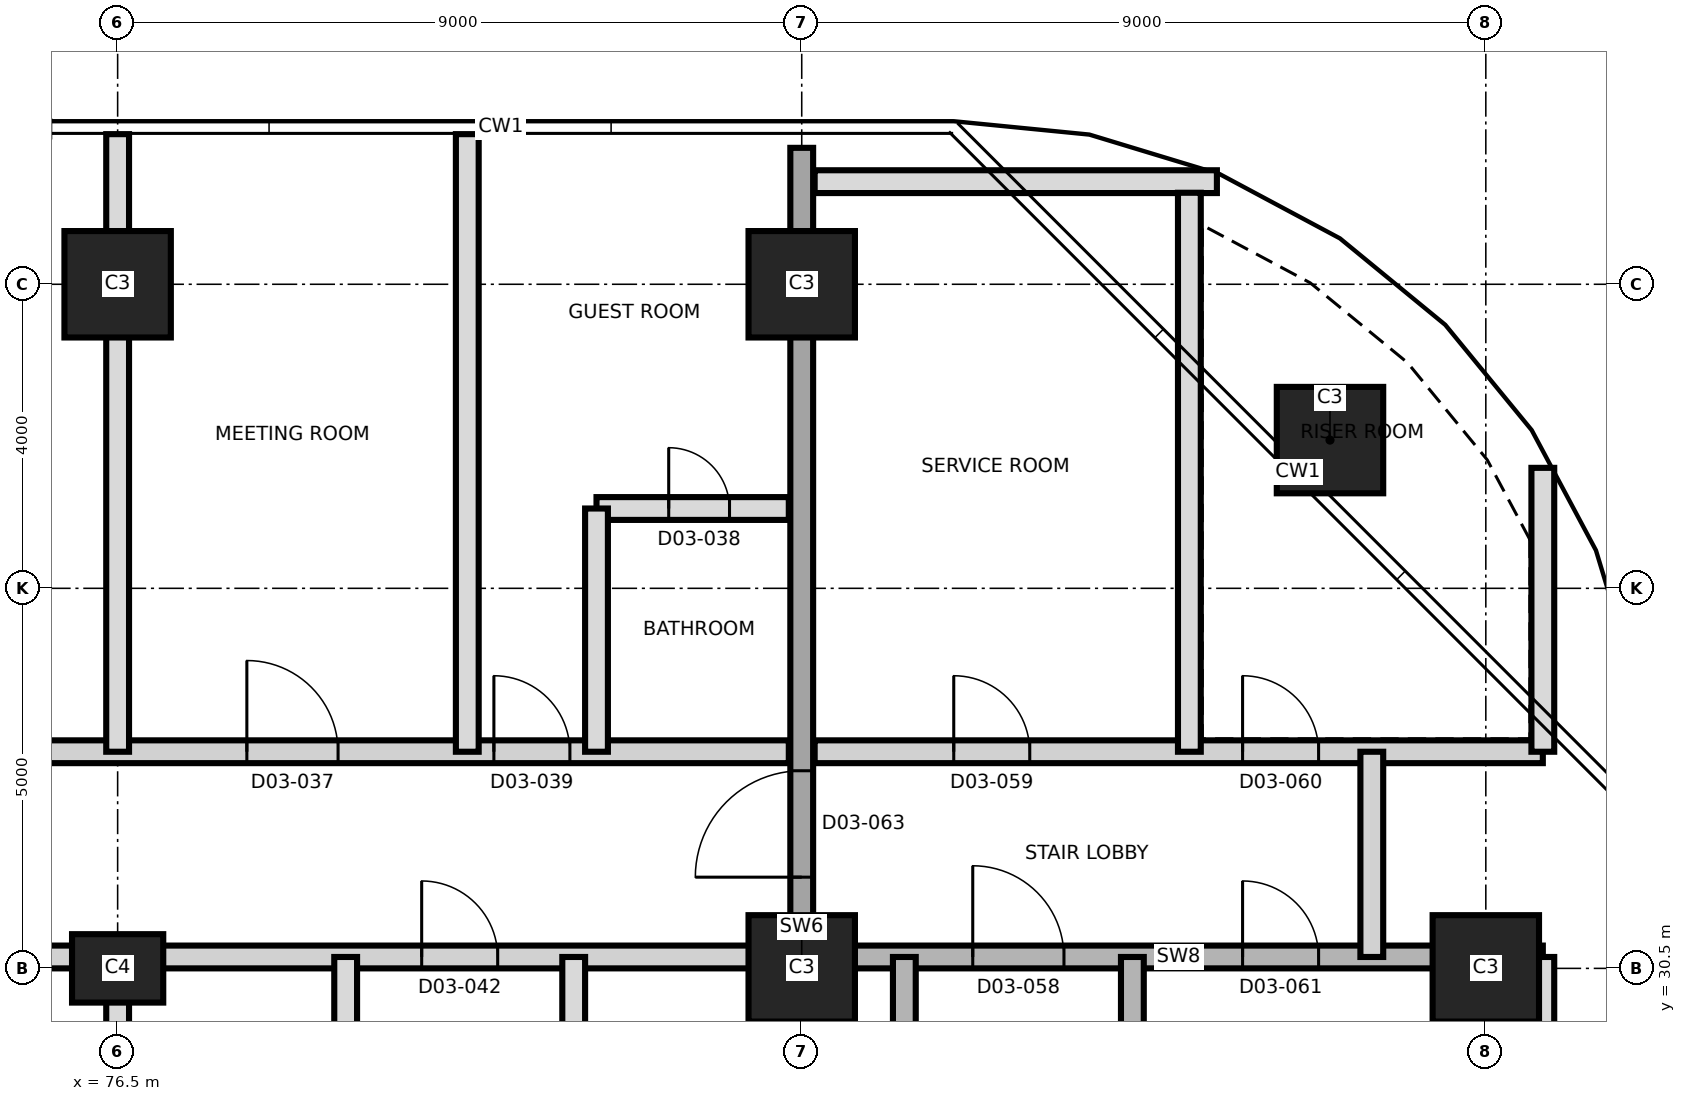
"""IFC4 building model, lengths in metres.
Left out: names, types, materials, properties, quantities, classifications, styles, units other than length and angle.
Written with IfcOpenShell. Run it as: python <this file> out.ifc"""

import sys

from ifc_helpers import new_model, si_unit, direction, frame, frame_2d, origin, origin_2d, place, context, subcontext, project, spatial, rectangle, extrude, element, fill, save


model = new_model("IFC4")
c1 = context("Model", 3, precision=1e-05, world=origin(), true_north=direction((0.0, 1.0)))
c2 = subcontext(c1, "Body", "Model", "MODEL_VIEW")
j1 = project(units=[si_unit("LENGTHUNIT", "METRE"), si_unit("PLANEANGLEUNIT", "RADIAN")], contexts=[c1])
p1 = place(None, origin())
s1 = spatial("IfcSite", under=j1, at=p1, CompositionType="ELEMENT")
p2 = place(p1, origin())
s2 = spatial("IfcBuilding", under=s1, at=p2, CompositionType="ELEMENT")
p3 = place(p2, frame((0.0, 0.0, 55.7)))
s3 = spatial("IfcBuildingStorey", under=s2, at=p3, CompositionType="ELEMENT", Elevation=55.7)
p4 = place(p3, frame((76.5, 30.5, 0.0), z_axis=(0.0, 0.0, 1.0), x_axis=(1.0, 0.0, 0.0)))
e1 = element("IfcColumn", 1, at=p4, inside=s3, PredefinedType="COLUMN", context=c2, shape_type="SweptSolid", body=[
    extrude(rectangle(XDim=1.2, YDim=0.9, at=origin_2d()), origin(), (0.0, 0.0, 1.0), 3.7),
])
for number, where, z_axis, x_axis in (
    (2, (85.5, 30.5, 0.0), (0.0, 0.0, 1.0), (1.0, 0.0, 0.0)),
    (3, (94.5, 30.5, 0.0), (0.0, 0.0, 1.0), (1.0, 0.0, 0.0)),
    (4, (92.45, 37.45, 0.0), (0.0, 0.0, 1.0), (1.0, 0.0, 0.0)),
    (5, (76.5, 39.5, 0.0), (0.0, 0.0, 1.0), (1.0, 0.0, 0.0)),
    (6, (85.5, 39.5, 0.0), (0.0, 0.0, 1.0), (1.0, 0.0, 0.0)),
):
    element("IfcColumn", number, at=place(p3, frame(where, z_axis=z_axis, x_axis=x_axis)), inside=s3, PredefinedType="COLUMN", context=c2, shape_type="SweptSolid", body=[
        extrude(rectangle(XDim=1.4, YDim=1.4, at=origin_2d()), origin(), (0.0, 0.0, 1.0), 3.7),
    ])
p5 = place(p3, frame((85.5, 19.705, 0.0), z_axis=(0.0, 0.0, 1.0), x_axis=(0.0, 1.0, 0.0)))
e7 = element("IfcWall", 7, at=p5, inside=s3, PredefinedType="SHEAR", context=c2, shape_type="SweptSolid", body=[
    extrude(rectangle(XDim=21.59, YDim=0.3, at=frame_2d((10.795, 0.0))), origin(), (0.0, 0.0, 1.0), 3.7),
])
p6 = place(p5, frame((11.995, 0.0, 0.0)))
e8 = element("IfcOpeningElement", 8, at=p6, cuts=e7, PredefinedType="OPENING", context=c2, shape_type="SweptSolid", body=[
    extrude(rectangle(XDim=1.4, YDim=2.1, at=frame_2d((0.7, 1.05))), frame((0.0, 0.16, 0.0), z_axis=(0.0, -1.0, 0.0), x_axis=(1.0, 0.0, 0.0)), (0.0, 0.0, 1.0), 0.32),
])
p7 = place(p3, frame((58.95, 30.65, 0.0), z_axis=(0.0, 0.0, 1.0), x_axis=(1.0, 0.0, 0.0)))
e9 = element("IfcWall", 9, at=p7, inside=s3, PredefinedType="PARTITIONING", context=c2, shape_type="SweptSolid", body=[
    extrude(rectangle(XDim=26.38, YDim=0.3, at=frame_2d((13.19, 0.0))), origin(), (0.0, 0.0, 1.0), 3.4),
])
p8 = place(p7, frame((0.685, 0.0, 0.0)))
e10 = element("IfcOpeningElement", 10, at=p8, cuts=e9, PredefinedType="OPENING", context=c2, shape_type="SweptSolid", body=[
    extrude(rectangle(XDim=1.2, YDim=2.1, at=frame_2d((0.6, 1.05))), frame((0.0, 0.16, 0.0), z_axis=(0.0, -1.0, 0.0), x_axis=(1.0, 0.0, 0.0)), (0.0, 0.0, 1.0), 0.32),
])
p9 = place(p7, frame((3.935, 0.0, 0.0)))
e11 = element("IfcOpeningElement", 11, at=p9, cuts=e9, PredefinedType="OPENING", context=c2, shape_type="SweptSolid", body=[
    extrude(rectangle(XDim=1.0, YDim=2.1, at=frame_2d((0.5, 1.05))), frame((0.0, 0.16, 0.0), z_axis=(0.0, -1.0, 0.0), x_axis=(1.0, 0.0, 0.0)), (0.0, 0.0, 1.0), 0.32),
])
p10 = place(p7, frame((9.685, 0.0, 0.0)))
e12 = element("IfcOpeningElement", 12, at=p10, cuts=e9, PredefinedType="OPENING", context=c2, shape_type="SweptSolid", body=[
    extrude(rectangle(XDim=1.2, YDim=2.1, at=frame_2d((0.6, 1.05))), frame((0.0, 0.16, 0.0), z_axis=(0.0, -1.0, 0.0), x_axis=(1.0, 0.0, 0.0)), (0.0, 0.0, 1.0), 0.32),
])
p11 = place(p7, frame((12.935, 0.0, 0.0)))
e13 = element("IfcOpeningElement", 13, at=p11, cuts=e9, PredefinedType="OPENING", context=c2, shape_type="SweptSolid", body=[
    extrude(rectangle(XDim=1.0, YDim=2.1, at=frame_2d((0.5, 1.05))), frame((0.0, 0.16, 0.0), z_axis=(0.0, -1.0, 0.0), x_axis=(1.0, 0.0, 0.0)), (0.0, 0.0, 1.0), 0.32),
])
p12 = place(p7, frame((21.55, 0.0, 0.0)))
e14 = element("IfcOpeningElement", 14, at=p12, cuts=e9, PredefinedType="OPENING", context=c2, shape_type="SweptSolid", body=[
    extrude(rectangle(XDim=1.0, YDim=2.4, at=frame_2d((0.5, 1.2))), frame((0.0, 0.16, 0.0), z_axis=(0.0, -1.0, 0.0), x_axis=(1.0, 0.0, 0.0)), (0.0, 0.0, 1.0), 0.32),
])
p13 = place(p3, frame((85.67, 30.65, 0.0), z_axis=(0.0, 0.0, 1.0), x_axis=(1.0, 0.0, 0.0)))
e15 = element("IfcWall", 15, at=p13, inside=s3, PredefinedType="SHEAR", context=c2, shape_type="SweptSolid", body=[
    extrude(rectangle(XDim=9.58, YDim=0.3, at=frame_2d((4.79, 0.0))), origin(), (0.0, 0.0, 1.0), 3.4),
])
p14 = place(p13, frame((2.08, 0.0, 0.0)))
e16 = element("IfcOpeningElement", 16, at=p14, cuts=e15, PredefinedType="OPENING", context=c2, shape_type="SweptSolid", body=[
    extrude(rectangle(XDim=1.2, YDim=2.1, at=frame_2d((0.6, 1.05))), frame((0.0, 0.16, 0.0), z_axis=(0.0, -1.0, 0.0), x_axis=(1.0, 0.0, 0.0)), (0.0, 0.0, 1.0), 0.32),
])
p15 = place(p13, frame((5.63, 0.0, 0.0)))
e17 = element("IfcOpeningElement", 17, at=p15, cuts=e15, PredefinedType="OPENING", context=c2, shape_type="SweptSolid", body=[
    extrude(rectangle(XDim=1.0, YDim=2.1, at=frame_2d((0.5, 1.05))), frame((0.0, 0.16, 0.0), z_axis=(0.0, -1.0, 0.0), x_axis=(1.0, 0.0, 0.0)), (0.0, 0.0, 1.0), 0.32),
])
p16 = place(p3, frame((58.95, 33.35, 0.0), z_axis=(0.0, 0.0, 1.0), x_axis=(1.0, 0.0, 0.0)))
e18 = element("IfcWall", 18, at=p16, inside=s3, PredefinedType="PARTITIONING", context=c2, shape_type="SweptSolid", body=[
    extrude(rectangle(XDim=26.38, YDim=0.3, at=frame_2d((13.19, 0.0))), origin(), (0.0, 0.0, 1.0), 3.4),
])
p17 = place(p16, frame((0.685, 0.0, 0.0)))
e19 = element("IfcOpeningElement", 19, at=p17, cuts=e18, PredefinedType="OPENING", context=c2, shape_type="SweptSolid", body=[
    extrude(rectangle(XDim=1.2, YDim=2.1, at=frame_2d((0.6, 1.05))), frame((0.0, 0.16, 0.0), z_axis=(0.0, -1.0, 0.0), x_axis=(1.0, 0.0, 0.0)), (0.0, 0.0, 1.0), 0.32),
])
p18 = place(p16, frame((3.935, 0.0, 0.0)))
e20 = element("IfcOpeningElement", 20, at=p18, cuts=e18, PredefinedType="OPENING", context=c2, shape_type="SweptSolid", body=[
    extrude(rectangle(XDim=1.0, YDim=2.1, at=frame_2d((0.5, 1.05))), frame((0.0, 0.16, 0.0), z_axis=(0.0, -1.0, 0.0), x_axis=(1.0, 0.0, 0.0)), (0.0, 0.0, 1.0), 0.32),
])
p19 = place(p16, frame((14.2, 0.0, 0.0)))
e21 = element("IfcOpeningElement", 21, at=p19, cuts=e18, PredefinedType="OPENING", context=c2, shape_type="SweptSolid", body=[
    extrude(rectangle(XDim=1.0, YDim=2.4, at=frame_2d((0.5, 1.2))), frame((0.0, 0.16, 0.0), z_axis=(0.0, -1.0, 0.0), x_axis=(1.0, 0.0, 0.0)), (0.0, 0.0, 1.0), 0.32),
])
p20 = place(p16, frame((19.25, 0.0, 0.0)))
e22 = element("IfcOpeningElement", 22, at=p20, cuts=e18, PredefinedType="OPENING", context=c2, shape_type="SweptSolid", body=[
    extrude(rectangle(XDim=1.2, YDim=2.1, at=frame_2d((0.6, 1.05))), frame((0.0, 0.16, 0.0), z_axis=(0.0, -1.0, 0.0), x_axis=(1.0, 0.0, 0.0)), (0.0, 0.0, 1.0), 0.32),
])
p21 = place(p16, frame((22.5, 0.0, 0.0)))
e23 = element("IfcOpeningElement", 23, at=p21, cuts=e18, PredefinedType="OPENING", context=c2, shape_type="SweptSolid", body=[
    extrude(rectangle(XDim=1.0, YDim=2.1, at=frame_2d((0.5, 1.05))), frame((0.0, 0.16, 0.0), z_axis=(0.0, -1.0, 0.0), x_axis=(1.0, 0.0, 0.0)), (0.0, 0.0, 1.0), 0.32),
])
p22 = place(p3, frame((85.67, 33.35, 0.0), z_axis=(0.0, 0.0, 1.0), x_axis=(1.0, 0.0, 0.0)))
e24 = element("IfcWall", 24, at=p22, inside=s3, PredefinedType="PARTITIONING", context=c2, shape_type="SweptSolid", body=[
    extrude(rectangle(XDim=9.58, YDim=0.3, at=frame_2d((4.79, 0.0))), origin(), (0.0, 0.0, 1.0), 3.4),
])
p23 = place(p22, frame((1.83, 0.0, 0.0)))
e25 = element("IfcOpeningElement", 25, at=p23, cuts=e24, PredefinedType="OPENING", context=c2, shape_type="SweptSolid", body=[
    extrude(rectangle(XDim=1.0, YDim=2.1, at=frame_2d((0.5, 1.05))), frame((0.0, 0.16, 0.0), z_axis=(0.0, -1.0, 0.0), x_axis=(1.0, 0.0, 0.0)), (0.0, 0.0, 1.0), 0.32),
])
p24 = place(p22, frame((5.63, 0.0, 0.0)))
e26 = element("IfcOpeningElement", 26, at=p24, cuts=e24, PredefinedType="OPENING", context=c2, shape_type="SweptSolid", body=[
    extrude(rectangle(XDim=1.0, YDim=2.1, at=frame_2d((0.5, 1.05))), frame((0.0, 0.16, 0.0), z_axis=(0.0, -1.0, 0.0), x_axis=(1.0, 0.0, 0.0)), (0.0, 0.0, 1.0), 0.32),
])
p25 = place(p3, frame((82.8, 36.55, 0.0), z_axis=(0.0, 0.0, 1.0), x_axis=(1.0, 0.0, 0.0)))
e27 = element("IfcWall", 27, at=p25, inside=s3, PredefinedType="PARTITIONING", context=c2, shape_type="SweptSolid", body=[
    extrude(rectangle(XDim=2.53, YDim=0.3, at=frame_2d((1.265, 0.0))), origin(), (0.0, 0.0, 1.0), 3.4),
])
p26 = place(p25, frame((0.95, 0.0, 0.0)))
e28 = element("IfcOpeningElement", 28, at=p26, cuts=e27, PredefinedType="OPENING", context=c2, shape_type="SweptSolid", body=[
    extrude(rectangle(XDim=0.8, YDim=2.1, at=frame_2d((0.4, 1.05))), frame((0.0, 0.16, 0.0), z_axis=(0.0, -1.0, 0.0), x_axis=(1.0, 0.0, 0.0)), (0.0, 0.0, 1.0), 0.32),
])
p27 = place(p3, frame((85.67, 40.85, 0.0), z_axis=(0.0, 0.0, 1.0), x_axis=(1.0, 0.0, 0.0)))
e29 = element("IfcWall", 29, at=p27, inside=s3, PredefinedType="PARTITIONING", context=c2, shape_type="SweptSolid", body=[
    extrude(rectangle(XDim=5.292, YDim=0.3, at=frame_2d((2.646, 0.0))), origin(), (0.0, 0.0, 1.0), 3.4),
])
p28 = place(p3, frame((76.5, 19.705, 0.0), z_axis=(0.0, 0.0, 1.0), x_axis=(0.0, 1.0, 0.0)))
e30 = element("IfcWall", 30, at=p28, inside=s3, PredefinedType="PARTITIONING", context=c2, shape_type="SweptSolid", body=[
    extrude(rectangle(XDim=10.945, YDim=0.3, at=frame_2d((5.472, 0.0))), origin(), (0.0, 0.0, 1.0), 3.4),
])
p29 = place(p3, frame((76.5, 33.35, 0.0), z_axis=(0.0, 0.0, 1.0), x_axis=(0.0, 1.0, 0.0)))
e31 = element("IfcWall", 31, at=p29, inside=s3, PredefinedType="PARTITIONING", context=c2, shape_type="SweptSolid", body=[
    extrude(rectangle(XDim=8.125, YDim=0.3, at=frame_2d((4.062, 0.0))), origin(), (0.0, 0.0, 1.0), 3.4),
])
p30 = place(p3, frame((79.5, 27.35, 0.0), z_axis=(0.0, 0.0, 1.0), x_axis=(0.0, 1.0, 0.0)))
e32 = element("IfcWall", 32, at=p30, inside=s3, PredefinedType="PARTITIONING", context=c2, shape_type="SweptSolid", body=[
    extrude(rectangle(XDim=3.3, YDim=0.3, at=frame_2d((1.65, 0.0))), origin(), (0.0, 0.0, 1.0), 3.4),
])
p31 = place(p3, frame((81.1, 33.35, 0.0), z_axis=(0.0, 0.0, 1.0), x_axis=(0.0, 1.0, 0.0)))
e33 = element("IfcWall", 33, at=p31, inside=s3, PredefinedType="PARTITIONING", context=c2, shape_type="SweptSolid", body=[
    extrude(rectangle(XDim=8.125, YDim=0.3, at=frame_2d((4.062, 0.0))), origin(), (0.0, 0.0, 1.0), 3.4),
])
p32 = place(p3, frame((82.5, 27.35, 0.0), z_axis=(0.0, 0.0, 1.0), x_axis=(0.0, 1.0, 0.0)))
e34 = element("IfcWall", 34, at=p32, inside=s3, PredefinedType="PARTITIONING", context=c2, shape_type="SweptSolid", body=[
    extrude(rectangle(XDim=3.3, YDim=0.3, at=frame_2d((1.65, 0.0))), origin(), (0.0, 0.0, 1.0), 3.4),
])
p33 = place(p3, frame((82.8, 33.35, 0.0), z_axis=(0.0, 0.0, 1.0), x_axis=(0.0, 1.0, 0.0)))
e35 = element("IfcWall", 35, at=p33, inside=s3, PredefinedType="PARTITIONING", context=c2, shape_type="SweptSolid", body=[
    extrude(rectangle(XDim=3.2, YDim=0.3, at=frame_2d((1.6, 0.0))), origin(), (0.0, 0.0, 1.0), 3.4),
])
for number, where, z_axis, x_axis in (
    (36, (86.85, 21.8, 0.0), (0.0, 0.0, 1.0), (0.0, 1.0, 0.0)),
    (37, (89.85, 21.8, 0.0), (0.0, 0.0, 1.0), (0.0, 1.0, 0.0)),
):
    element("IfcWall", number, at=place(p3, frame(where, z_axis=z_axis, x_axis=x_axis)), inside=s3, PredefinedType="SHEAR", context=c2, shape_type="SweptSolid", body=[
        extrude(rectangle(XDim=8.85, YDim=0.3, at=frame_2d((4.425, 0.0))), origin(), (0.0, 0.0, 1.0), 3.4),
    ])
p34 = place(p3, frame((90.6, 33.35, 0.0), z_axis=(0.0, 0.0, 1.0), x_axis=(0.0, 1.0, 0.0)))
e38 = element("IfcWall", 38, at=p34, inside=s3, PredefinedType="PARTITIONING", context=c2, shape_type="SweptSolid", body=[
    extrude(rectangle(XDim=7.354, YDim=0.3, at=frame_2d((3.677, 0.0))), origin(), (0.0, 0.0, 1.0), 3.4),
])
p35 = place(p3, frame((93.0, 30.65, 0.0), z_axis=(0.0, 0.0, 1.0), x_axis=(0.0, 1.0, 0.0)))
e39 = element("IfcWall", 39, at=p35, inside=s3, PredefinedType="PARTITIONING", context=c2, shape_type="SweptSolid", body=[
    extrude(rectangle(XDim=2.7, YDim=0.3, at=frame_2d((1.35, 0.0))), origin(), (0.0, 0.0, 1.0), 3.4),
])
p36 = place(p3, frame((95.25, 23.915, 0.0), z_axis=(0.0, 0.0, 1.0), x_axis=(0.0, 1.0, 0.0)))
e40 = element("IfcWall", 40, at=p36, inside=s3, PredefinedType="PARTITIONING", context=c2, shape_type="SweptSolid", body=[
    extrude(rectangle(XDim=6.735, YDim=0.3, at=frame_2d((3.367, 0.0))), origin(), (0.0, 0.0, 1.0), 3.4),
])
p37 = place(p3, frame((95.25, 33.35, 0.0), z_axis=(0.0, 0.0, 1.0), x_axis=(0.0, 1.0, 0.0)))
e41 = element("IfcWall", 41, at=p37, inside=s3, PredefinedType="PARTITIONING", context=c2, shape_type="SweptSolid", body=[
    extrude(rectangle(XDim=3.735, YDim=0.3, at=frame_2d((1.867, 0.0))), origin(), (0.0, 0.0, 1.0), 3.4),
])
p38 = place(p20, origin())
e42 = element("IfcDoor", 42, at=p38, inside=s3, OperationType="SINGLE_SWING_RIGHT", PredefinedType="DOOR", context=c2, shape_type="SweptSolid", body=[
    extrude(rectangle(XDim=1.2, YDim=2.1, at=frame_2d((0.6, 1.05))), frame((0.0, 0.025, 0.0), z_axis=(0.0, -1.0, 0.0), x_axis=(1.0, 0.0, 0.0)), (0.0, 0.0, 1.0), 0.05),
])
fill(e22, e42)
p39 = place(p26, origin())
e43 = element("IfcDoor", 43, at=p39, inside=s3, OperationType="SINGLE_SWING_LEFT", PredefinedType="DOOR", context=c2, shape_type="SweptSolid", body=[
    extrude(rectangle(XDim=0.8, YDim=2.1, at=frame_2d((0.4, 1.05))), frame((0.0, 0.025, 0.0), z_axis=(0.0, -1.0, 0.0), x_axis=(1.0, 0.0, 0.0)), (0.0, 0.0, 1.0), 0.05),
])
fill(e28, e43)
p40 = place(p21, origin())
e44 = element("IfcDoor", 44, at=p40, inside=s3, OperationType="SINGLE_SWING_LEFT", PredefinedType="DOOR", context=c2, shape_type="SweptSolid", body=[
    extrude(rectangle(XDim=1.0, YDim=2.1, at=frame_2d((0.5, 1.05))), frame((0.0, 0.025, 0.0), z_axis=(0.0, -1.0, 0.0), x_axis=(1.0, 0.0, 0.0)), (0.0, 0.0, 1.0), 0.05),
])
fill(e23, e44)
p41 = place(p12, origin())
e45 = element("IfcDoor", 45, at=p41, inside=s3, OperationType="SINGLE_SWING_RIGHT", PredefinedType="DOOR", context=c2, shape_type="SweptSolid", body=[
    extrude(rectangle(XDim=1.0, YDim=2.4, at=frame_2d((0.5, 1.2))), frame((0.0, 0.025, 0.0), z_axis=(0.0, -1.0, 0.0), x_axis=(1.0, 0.0, 0.0)), (0.0, 0.0, 1.0), 0.05),
])
fill(e14, e45)
p42 = place(p14, origin())
e46 = element("IfcDoor", 46, at=p42, inside=s3, OperationType="SINGLE_SWING_LEFT", PredefinedType="DOOR", context=c2, shape_type="SweptSolid", body=[
    extrude(rectangle(XDim=1.2, YDim=2.1, at=frame_2d((0.6, 1.05))), frame((0.0, 0.025, 0.0), z_axis=(0.0, -1.0, 0.0), x_axis=(1.0, 0.0, 0.0)), (0.0, 0.0, 1.0), 0.05),
])
fill(e16, e46)
p43 = place(p23, origin())
e47 = element("IfcDoor", 47, at=p43, inside=s3, OperationType="SINGLE_SWING_LEFT", PredefinedType="DOOR", context=c2, shape_type="SweptSolid", body=[
    extrude(rectangle(XDim=1.0, YDim=2.1, at=frame_2d((0.5, 1.05))), frame((0.0, 0.025, 0.0), z_axis=(0.0, -1.0, 0.0), x_axis=(1.0, 0.0, 0.0)), (0.0, 0.0, 1.0), 0.05),
])
fill(e25, e47)
p44 = place(p24, origin())
e48 = element("IfcDoor", 48, at=p44, inside=s3, OperationType="SINGLE_SWING_RIGHT", PredefinedType="DOOR", context=c2, shape_type="SweptSolid", body=[
    extrude(rectangle(XDim=1.0, YDim=2.1, at=frame_2d((0.5, 1.05))), frame((0.0, 0.025, 0.0), z_axis=(0.0, -1.0, 0.0), x_axis=(1.0, 0.0, 0.0)), (0.0, 0.0, 1.0), 0.05),
])
fill(e26, e48)
p45 = place(p15, origin())
e49 = element("IfcDoor", 49, at=p45, inside=s3, OperationType="SINGLE_SWING_LEFT", PredefinedType="DOOR", context=c2, shape_type="SweptSolid", body=[
    extrude(rectangle(XDim=1.0, YDim=2.1, at=frame_2d((0.5, 1.05))), frame((0.0, 0.025, 0.0), z_axis=(0.0, -1.0, 0.0), x_axis=(1.0, 0.0, 0.0)), (0.0, 0.0, 1.0), 0.05),
])
fill(e17, e49)
p46 = place(p6, origin())
e50 = element("IfcDoor", 50, at=p46, inside=s3, OperationType="SINGLE_SWING_RIGHT", PredefinedType="DOOR", context=c2, shape_type="SweptSolid", body=[
    extrude(rectangle(XDim=1.4, YDim=2.1, at=frame_2d((0.7, 1.05))), frame((0.0, 0.025, 0.0), z_axis=(0.0, -1.0, 0.0), x_axis=(1.0, 0.0, 0.0)), (0.0, 0.0, 1.0), 0.05),
])
fill(e8, e50)
save(model, sys.argv[1])
